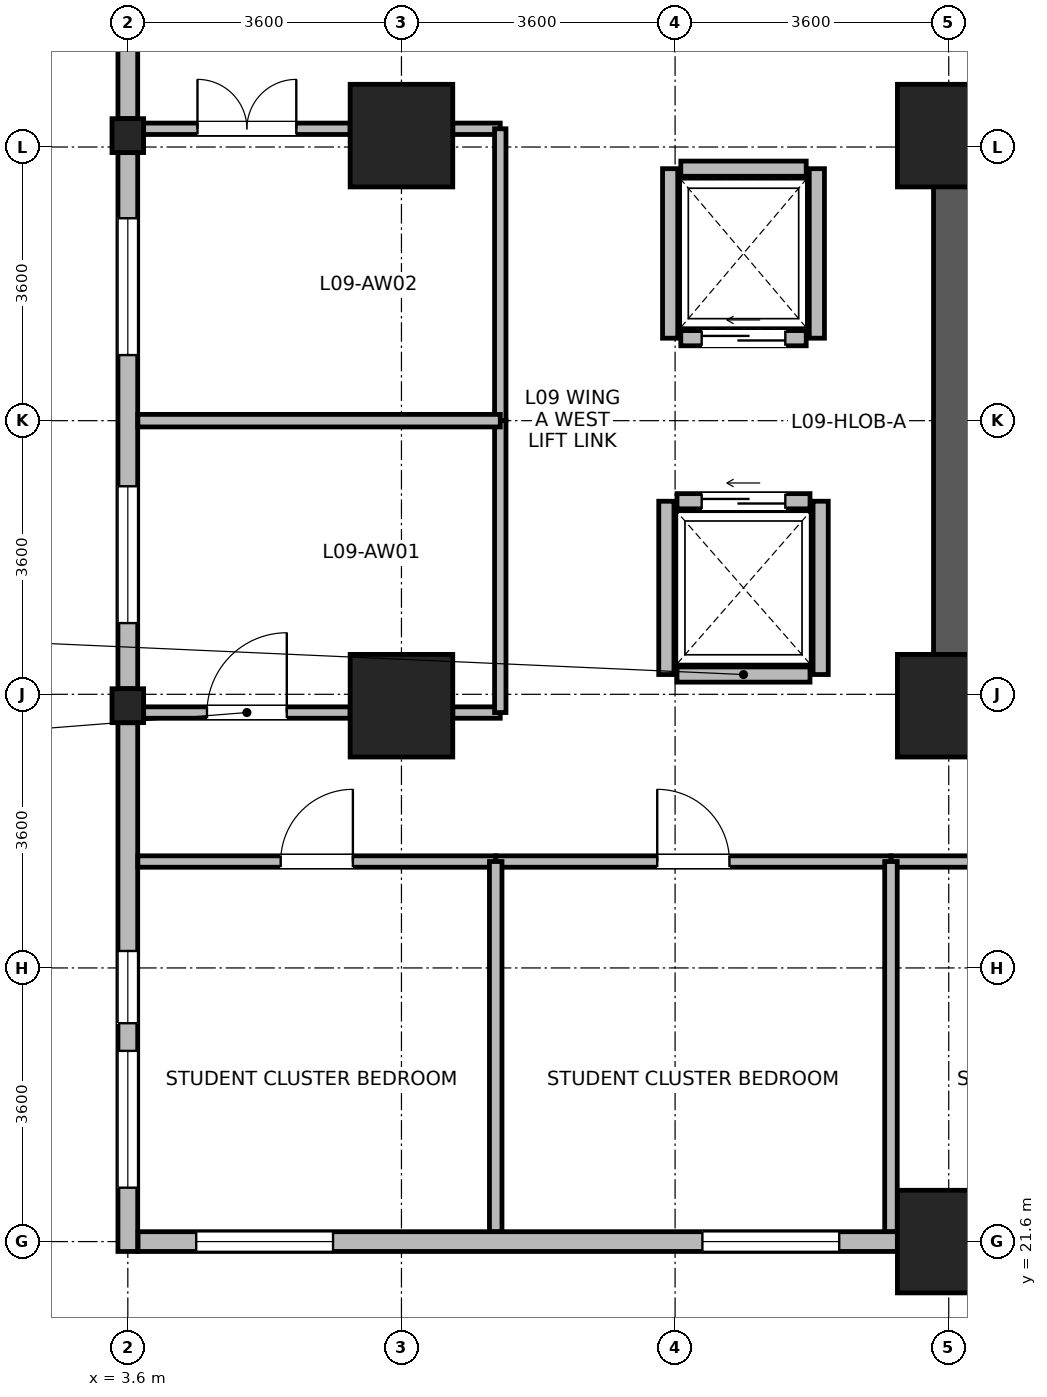
"""IFC4 building model, lengths in metres.
Left out: names, types, materials, properties, quantities, classifications, styles, units other than length and angle.
Written with IfcOpenShell. Run it as: python <this file> out.ifc"""

import sys

from ifc_helpers import new_model, si_unit, direction, frame, frame_2d, origin, origin_2d, place, context, subcontext, project, spatial, rectangle, i_section, extrude, source, transform, mapped, element, fill, save


model = new_model("IFC4")
c1 = context("Model", 3, precision=1e-05, world=origin(), true_north=direction((0.0, 1.0)))
c2 = subcontext(c1, "Body", "Model", "MODEL_VIEW")
j1 = project(units=[si_unit("LENGTHUNIT", "METRE"), si_unit("PLANEANGLEUNIT", "RADIAN")], contexts=[c1])
p1 = place(None, origin())
s1 = spatial("IfcSite", under=j1, at=p1, CompositionType="ELEMENT")
p2 = place(p1, origin())
s2 = spatial("IfcBuilding", under=s1, at=p2, CompositionType="ELEMENT")
p3 = place(p2, frame((0.0, 0.0, 40.1)))
s3 = spatial("IfcBuildingStorey", under=s2, at=p3, CompositionType="ELEMENT", Elevation=40.1)
p4 = place(p3, frame((14.475, 28.3, 0.0), z_axis=(0.0, 0.0, 1.0), x_axis=(0.0, 1.0, 0.0)))
e1 = element("IfcWall", 1, at=p4, inside=s3, PredefinedType="SHEAR", context=c2, shape_type="SweptSolid", body=[
    extrude(rectangle(XDim=8.1, YDim=0.55, at=frame_2d((4.05, 0.0))), origin(), (0.0, 0.0, 1.0), 3.45),
])
m1 = source(origin(), c2, "Body", "SweptSolid", [
    extrude(rectangle(XDim=1.35, YDim=1.35, at=origin_2d()), origin(), (0.0, 0.0, 1.0), 3.7),
])
for number, where, z_axis, x_axis in (
    (2, (7.2, 28.65, 0.0), (0.0, 0.0, 1.0), (1.0, 0.0, 0.0)),
    (3, (7.2, 36.15, 0.0), (0.0, 0.0, 1.0), (1.0, 0.0, 0.0)),
    (4, (14.4, 21.6, 0.0), (0.0, 0.0, 1.0), (1.0, 0.0, 0.0)),
    (5, (14.4, 28.65, 0.0), (0.0, 0.0, 1.0), (1.0, 0.0, 0.0)),
    (6, (14.4, 36.15, 0.0), (0.0, 0.0, 1.0), (1.0, 0.0, 0.0)),
):
    element("IfcColumn", number, at=place(p3, frame(where, z_axis=z_axis, x_axis=x_axis)), inside=s3, PredefinedType="COLUMN", context=c2, shape_type="MappedRepresentation", body=[
        mapped(m1, transform((0.0, 0.0, 0.0), x_axis=(1.0, 0.0, 0.0), y_axis=(0.0, 1.0, 0.0), z_axis=(0.0, 0.0, 1.0), scale=1.0)),
    ])
m2 = source(origin(), c2, "Body", "SweptSolid", [
    extrude(i_section(OverallWidth=0.416, OverallDepth=0.446, WebThickness=0.029, FlangeThickness=0.04, FilletRadius=0.015, at=origin_2d()), origin(), (0.0, 0.0, 1.0), 3.7),
])
for number, where, z_axis, x_axis in (
    (7, (3.6, 28.65, 0.0), (0.0, 0.0, 1.0), (1.0, 0.0, 0.0)),
    (8, (3.6, 36.15, 0.0), (0.0, 0.0, 1.0), (1.0, 0.0, 0.0)),
):
    element("IfcColumn", number, at=place(p3, frame(where, z_axis=z_axis, x_axis=x_axis)), inside=s3, PredefinedType="COLUMN", context=c2, shape_type="MappedRepresentation", body=[
        mapped(m2, transform((0.0, 0.0, 0.0), x_axis=(1.0, 0.0, 0.0), y_axis=(0.0, 1.0, 0.0), z_axis=(0.0, 0.0, 1.0), scale=1.0)),
    ])
p5 = place(p3, frame((3.6, 36.374, 0.0), z_axis=(0.0, 0.0, 1.0), x_axis=(0.0, 1.0, 0.0)))
e9 = element("IfcWall", 9, at=p5, inside=s3, PredefinedType="STANDARD", context=c2, shape_type="SweptSolid", body=[
    extrude(rectangle(XDim=6.956, YDim=0.26, at=frame_2d((3.478, 0.0))), origin(), (0.0, 0.0, 1.0), 3.43),
])
p6 = place(p5, frame((4.317, 0.0, 0.85)))
e10 = element("IfcOpeningElement", 10, at=p6, cuts=e9, PredefinedType="OPENING", context=c2, shape_type="SweptSolid", body=[
    extrude(rectangle(XDim=1.8, YDim=1.85, at=frame_2d((0.9, 0.925))), frame((0.0, 0.14, 0.0), z_axis=(0.0, -1.0, 0.0), x_axis=(1.0, 0.0, 0.0)), (0.0, 0.0, 1.0), 0.28),
])
p7 = place(p5, frame((3.003, 0.0, 0.85)))
e11 = element("IfcOpeningElement", 11, at=p7, cuts=e9, PredefinedType="OPENING", context=c2, shape_type="SweptSolid", body=[
    extrude(rectangle(XDim=0.95, YDim=1.75, at=frame_2d((0.475, 0.875))), frame((0.0, 0.14, 0.0), z_axis=(0.0, -1.0, 0.0), x_axis=(1.0, 0.0, 0.0)), (0.0, 0.0, 1.0), 0.28),
])
p8 = place(p3, frame((3.6, 28.874, 0.0), z_axis=(0.0, 0.0, 1.0), x_axis=(0.0, 1.0, 0.0)))
e12 = element("IfcWall", 12, at=p8, inside=s3, PredefinedType="STANDARD", context=c2, shape_type="SweptSolid", body=[
    extrude(rectangle(XDim=7.052, YDim=0.26, at=frame_2d((3.526, 0.0))), origin(), (0.0, 0.0, 1.0), 2.93),
])
p9 = place(p8, frame((0.863, 0.0, 0.85)))
e13 = element("IfcOpeningElement", 13, at=p9, cuts=e12, PredefinedType="OPENING", context=c2, shape_type="SweptSolid", body=[
    extrude(rectangle(XDim=1.8, YDim=1.85, at=frame_2d((0.9, 0.925))), frame((0.0, 0.14, 0.0), z_axis=(0.0, -1.0, 0.0), x_axis=(1.0, 0.0, 0.0)), (0.0, 0.0, 1.0), 0.28),
])
p10 = place(p8, frame((4.389, 0.0, 0.85)))
e14 = element("IfcOpeningElement", 14, at=p10, cuts=e12, PredefinedType="OPENING", context=c2, shape_type="SweptSolid", body=[
    extrude(rectangle(XDim=1.8, YDim=1.85, at=frame_2d((0.9, 0.925))), frame((0.0, 0.14, 0.0), z_axis=(0.0, -1.0, 0.0), x_axis=(1.0, 0.0, 0.0)), (0.0, 0.0, 1.0), 0.28),
])
p11 = place(p3, frame((3.6, 21.47, 0.0), z_axis=(0.0, 0.0, 1.0), x_axis=(0.0, 1.0, 0.0)))
e15 = element("IfcWall", 15, at=p11, inside=s3, PredefinedType="STANDARD", context=c2, shape_type="SweptSolid", body=[
    extrude(rectangle(XDim=6.956, YDim=0.26, at=frame_2d((3.478, 0.0))), origin(), (0.0, 0.0, 1.0), 3.43),
])
p12 = place(p11, frame((0.839, 0.0, 0.85)))
e16 = element("IfcOpeningElement", 16, at=p12, cuts=e15, PredefinedType="OPENING", context=c2, shape_type="SweptSolid", body=[
    extrude(rectangle(XDim=1.8, YDim=1.85, at=frame_2d((0.9, 0.925))), frame((0.0, 0.14, 0.0), z_axis=(0.0, -1.0, 0.0), x_axis=(1.0, 0.0, 0.0)), (0.0, 0.0, 1.0), 0.28),
])
p13 = place(p11, frame((3.003, 0.0, 0.85)))
e17 = element("IfcOpeningElement", 17, at=p13, cuts=e15, PredefinedType="OPENING", context=c2, shape_type="SweptSolid", body=[
    extrude(rectangle(XDim=0.95, YDim=1.75, at=frame_2d((0.475, 0.875))), frame((0.0, 0.14, 0.0), z_axis=(0.0, -1.0, 0.0), x_axis=(1.0, 0.0, 0.0)), (0.0, 0.0, 1.0), 0.28),
])
p14 = place(p3, frame((13.724, 21.6, 0.0), z_axis=(0.0, 0.0, 1.0), x_axis=(-1.0, 0.0, 0.0)))
e18 = element("IfcWall", 18, at=p14, inside=s3, PredefinedType="STANDARD", context=c2, shape_type="SweptSolid", body=[
    extrude(rectangle(XDim=9.989, YDim=0.26, at=frame_2d((4.995, 0.0))), origin(), (0.0, 0.0, 1.0), 3.43),
])
p15 = place(p14, frame((0.765, 0.0, 0.85)))
e19 = element("IfcOpeningElement", 19, at=p15, cuts=e18, PredefinedType="OPENING", context=c2, shape_type="SweptSolid", body=[
    extrude(rectangle(XDim=1.8, YDim=1.85, at=frame_2d((0.9, 0.925))), frame((0.0, 0.14, 0.0), z_axis=(0.0, -1.0, 0.0), x_axis=(1.0, 0.0, 0.0)), (0.0, 0.0, 1.0), 0.28),
])
p16 = place(p14, frame((7.424, 0.0, 0.85)))
e20 = element("IfcOpeningElement", 20, at=p16, cuts=e18, PredefinedType="OPENING", context=c2, shape_type="SweptSolid", body=[
    extrude(rectangle(XDim=1.8, YDim=1.85, at=frame_2d((0.9, 0.925))), frame((0.0, 0.14, 0.0), z_axis=(0.0, -1.0, 0.0), x_axis=(1.0, 0.0, 0.0)), (0.0, 0.0, 1.0), 0.28),
])
p17 = place(p3, frame((10.825, 29.06, 0.0), z_axis=(0.0, 0.0, 1.0), x_axis=(1.0, 0.0, 0.0)))
e21 = element("IfcWall", 21, at=p17, inside=s3, PredefinedType="PARTITIONING", context=c2, shape_type="SweptSolid", body=[
    extrude(rectangle(XDim=1.75, YDim=0.2, at=frame_2d((0.875, 0.0))), origin(), (0.0, 0.0, 1.0), 3.43),
])
p18 = place(p3, frame((10.825, 31.34, 0.0), z_axis=(0.0, 0.0, 1.0), x_axis=(1.0, 0.0, 0.0)))
e22 = element("IfcWall", 22, at=p18, inside=s3, PredefinedType="PARTITIONING", context=c2, shape_type="SweptSolid", body=[
    extrude(rectangle(XDim=1.75, YDim=0.2, at=frame_2d((0.875, 0.0))), origin(), (0.0, 0.0, 1.0), 3.43),
])
p19 = place(p18, frame((0.325, 0.0, 0.0)))
e23 = element("IfcOpeningElement", 23, at=p19, cuts=e22, PredefinedType="OPENING", context=c2, shape_type="SweptSolid", body=[
    extrude(rectangle(XDim=1.1, YDim=2.12, at=frame_2d((0.55, 1.06))), frame((0.0, 0.11, 0.0), z_axis=(0.0, -1.0, 0.0), x_axis=(1.0, 0.0, 0.0)), (0.0, 0.0, 1.0), 0.22),
])
for number, where, z_axis, x_axis in (
    (24, (10.685, 29.06, 0.0), (0.0, 0.0, 1.0), (0.0, 1.0, 0.0)),
    (25, (12.715, 29.06, 0.0), (0.0, 0.0, 1.0), (0.0, 1.0, 0.0)),
):
    element("IfcWall", number, at=place(p3, frame(where, z_axis=z_axis, x_axis=x_axis)), inside=s3, PredefinedType="PARTITIONING", context=c2, shape_type="SweptSolid", body=[
        extrude(rectangle(XDim=2.28, YDim=0.2, at=frame_2d((1.14, 0.0))), origin(), (0.0, 0.0, 1.0), 3.43),
    ])
p20 = place(p3, frame((10.875, 33.485, 0.0), z_axis=(0.0, 0.0, 1.0), x_axis=(1.0, 0.0, 0.0)))
e26 = element("IfcWall", 26, at=p20, inside=s3, PredefinedType="PARTITIONING", context=c2, shape_type="SweptSolid", body=[
    extrude(rectangle(XDim=1.65, YDim=0.2, at=frame_2d((0.825, 0.0))), origin(), (0.0, 0.0, 1.0), 3.43),
])
p21 = place(p20, frame((0.275, 0.0, 0.0)))
e27 = element("IfcOpeningElement", 27, at=p21, cuts=e26, PredefinedType="OPENING", context=c2, shape_type="SweptSolid", body=[
    extrude(rectangle(XDim=1.1, YDim=2.12, at=frame_2d((0.55, 1.06))), frame((0.0, 0.11, 0.0), z_axis=(0.0, -1.0, 0.0), x_axis=(1.0, 0.0, 0.0)), (0.0, 0.0, 1.0), 0.22),
])
p22 = place(p3, frame((10.875, 35.715, 0.0), z_axis=(0.0, 0.0, 1.0), x_axis=(1.0, 0.0, 0.0)))
e28 = element("IfcWall", 28, at=p22, inside=s3, PredefinedType="PARTITIONING", context=c2, shape_type="SweptSolid", body=[
    extrude(rectangle(XDim=1.65, YDim=0.2, at=frame_2d((0.825, 0.0))), origin(), (0.0, 0.0, 1.0), 3.43),
])
for number, where, z_axis, x_axis in (
    (29, (10.735, 33.485, 0.0), (0.0, 0.0, 1.0), (0.0, 1.0, 0.0)),
    (30, (12.665, 33.485, 0.0), (0.0, 0.0, 1.0), (0.0, 1.0, 0.0)),
):
    element("IfcWall", number, at=place(p3, frame(where, z_axis=z_axis, x_axis=x_axis)), inside=s3, PredefinedType="PARTITIONING", context=c2, shape_type="SweptSolid", body=[
        extrude(rectangle(XDim=2.23, YDim=0.2, at=frame_2d((1.115, 0.0))), origin(), (0.0, 0.0, 1.0), 3.43),
    ])
p23 = place(p3, frame((13.64, 26.6, 0.0), z_axis=(0.0, 0.0, 1.0), x_axis=(1.0, 0.0, 0.0)))
e31 = element("IfcWall", 31, at=p23, inside=s3, PredefinedType="PARTITIONING", context=c2, shape_type="SweptSolid", body=[
    extrude(rectangle(XDim=5.58, YDim=0.15, at=frame_2d((2.79, 0.0))), origin(), (0.0, 0.0, 1.0), 3.43),
])
p24 = place(p23, frame((2.315, 0.0, 0.0)))
e32 = element("IfcOpeningElement", 32, at=p24, cuts=e31, PredefinedType="OPENING", context=c2, shape_type="SweptSolid", body=[
    extrude(rectangle(XDim=0.95, YDim=2.1, at=frame_2d((0.475, 1.05))), frame((0.0, 0.085, 0.0), z_axis=(0.0, -1.0, 0.0), x_axis=(1.0, 0.0, 0.0)), (0.0, 0.0, 1.0), 0.17),
])
p25 = place(p3, frame((8.44, 26.6, 0.0), z_axis=(0.0, 0.0, 1.0), x_axis=(1.0, 0.0, 0.0)))
e33 = element("IfcWall", 33, at=p25, inside=s3, PredefinedType="PARTITIONING", context=c2, shape_type="SweptSolid", body=[
    extrude(rectangle(XDim=5.2, YDim=0.15, at=frame_2d((2.6, 0.0))), origin(), (0.0, 0.0, 1.0), 3.43),
])
p26 = place(p25, frame((2.125, 0.0, 0.0)))
e34 = element("IfcOpeningElement", 34, at=p26, cuts=e33, PredefinedType="OPENING", context=c2, shape_type="SweptSolid", body=[
    extrude(rectangle(XDim=0.95, YDim=2.1, at=frame_2d((0.475, 1.05))), frame((0.0, 0.085, 0.0), z_axis=(0.0, -1.0, 0.0), x_axis=(1.0, 0.0, 0.0)), (0.0, 0.0, 1.0), 0.17),
])
p27 = place(p3, frame((3.808, 28.56, 0.0), z_axis=(0.0, 0.0, 1.0), x_axis=(1.0, 0.0, 0.0)))
e35 = element("IfcWall", 35, at=p27, inside=s3, PredefinedType="PARTITIONING", context=c2, shape_type="SweptSolid", body=[
    extrude(rectangle(XDim=2.717, YDim=0.15, at=frame_2d((1.358, 0.0))), origin(), (0.0, 0.0, 1.0), 2.78),
])
p28 = place(p27, frame((0.833, 0.0, 0.0)))
e36 = element("IfcOpeningElement", 36, at=p28, cuts=e35, PredefinedType="OPENING", context=c2, shape_type="SweptSolid", body=[
    extrude(rectangle(XDim=1.05, YDim=2.12, at=frame_2d((0.525, 1.06))), frame((0.0, 0.085, 0.0), z_axis=(0.0, -1.0, 0.0), x_axis=(1.0, 0.0, 0.0)), (0.0, 0.0, 1.0), 0.17),
])
p29 = place(p3, frame((7.875, 28.56, 0.0), z_axis=(0.0, 0.0, 1.0), x_axis=(1.0, 0.0, 0.0)))
e37 = element("IfcWall", 37, at=p29, inside=s3, PredefinedType="PARTITIONING", context=c2, shape_type="SweptSolid", body=[
    extrude(rectangle(XDim=0.625, YDim=0.15, at=frame_2d((0.312, 0.0))), origin(), (0.0, 0.0, 1.0), 2.78),
])
p30 = place(p3, frame((3.808, 36.24, 0.0), z_axis=(0.0, 0.0, 1.0), x_axis=(1.0, 0.0, 0.0)))
e38 = element("IfcWall", 38, at=p30, inside=s3, PredefinedType="PARTITIONING", context=c2, shape_type="SweptSolid", body=[
    extrude(rectangle(XDim=2.717, YDim=0.15, at=frame_2d((1.358, 0.0))), origin(), (0.0, 0.0, 1.0), 2.78),
])
p31 = place(p30, frame((0.708, 0.0, 0.0)))
e39 = element("IfcOpeningElement", 39, at=p31, cuts=e38, PredefinedType="OPENING", context=c2, shape_type="SweptSolid", body=[
    extrude(rectangle(XDim=1.3, YDim=2.12, at=frame_2d((0.65, 1.06))), frame((0.0, 0.085, 0.0), z_axis=(0.0, -1.0, 0.0), x_axis=(1.0, 0.0, 0.0)), (0.0, 0.0, 1.0), 0.17),
])
p32 = place(p3, frame((7.875, 36.24, 0.0), z_axis=(0.0, 0.0, 1.0), x_axis=(1.0, 0.0, 0.0)))
e40 = element("IfcWall", 40, at=p32, inside=s3, PredefinedType="PARTITIONING", context=c2, shape_type="SweptSolid", body=[
    extrude(rectangle(XDim=0.625, YDim=0.15, at=frame_2d((0.312, 0.0))), origin(), (0.0, 0.0, 1.0), 2.78),
])
p33 = place(p3, frame((3.732, 26.6, 0.0), z_axis=(0.0, 0.0, 1.0), x_axis=(1.0, 0.0, 0.0)))
e41 = element("IfcWall", 41, at=p33, inside=s3, PredefinedType="PARTITIONING", context=c2, shape_type="SweptSolid", body=[
    extrude(rectangle(XDim=4.708, YDim=0.15, at=frame_2d((2.354, 0.0))), origin(), (0.0, 0.0, 1.0), 3.43),
])
p34 = place(p33, frame((1.879, 0.0, 0.0)))
e42 = element("IfcOpeningElement", 42, at=p34, cuts=e41, PredefinedType="OPENING", context=c2, shape_type="SweptSolid", body=[
    extrude(rectangle(XDim=0.95, YDim=2.1, at=frame_2d((0.475, 1.05))), frame((0.0, 0.085, 0.0), z_axis=(0.0, -1.0, 0.0), x_axis=(1.0, 0.0, 0.0)), (0.0, 0.0, 1.0), 0.17),
])
p35 = place(p3, frame((8.5, 32.4, 0.0), z_axis=(0.0, 0.0, 1.0), x_axis=(0.0, 1.0, 0.0)))
e43 = element("IfcWall", 43, at=p35, inside=s3, PredefinedType="PARTITIONING", context=c2, shape_type="SweptSolid", body=[
    extrude(rectangle(XDim=3.84, YDim=0.15, at=frame_2d((1.92, 0.0))), origin(), (0.0, 0.0, 1.0), 3.43),
])
p36 = place(p3, frame((8.5, 28.56, 0.0), z_axis=(0.0, 0.0, 1.0), x_axis=(0.0, 1.0, 0.0)))
e44 = element("IfcWall", 44, at=p36, inside=s3, PredefinedType="PARTITIONING", context=c2, shape_type="SweptSolid", body=[
    extrude(rectangle(XDim=3.84, YDim=0.15, at=frame_2d((1.92, 0.0))), origin(), (0.0, 0.0, 1.0), 3.43),
])
for number, where, z_axis, x_axis in (
    (45, (8.44, 21.732, 0.0), (0.0, 0.0, 1.0), (0.0, 1.0, 0.0)),
    (46, (13.64, 21.732, 0.0), (0.0, 0.0, 1.0), (0.0, 1.0, 0.0)),
):
    element("IfcWall", number, at=place(p3, frame(where, z_axis=z_axis, x_axis=x_axis)), inside=s3, PredefinedType="PARTITIONING", context=c2, shape_type="SweptSolid", body=[
        extrude(rectangle(XDim=4.868, YDim=0.165, at=frame_2d((2.434, 0.0))), origin(), (0.0, 0.0, 1.0), 3.43),
    ])
p37 = place(p3, frame((3.732, 32.4, 0.0), z_axis=(0.0, 0.0, 1.0), x_axis=(1.0, 0.0, 0.0)))
e47 = element("IfcWall", 47, at=p37, inside=s3, PredefinedType="PARTITIONING", context=c2, shape_type="SweptSolid", body=[
    extrude(rectangle(XDim=4.768, YDim=0.165, at=frame_2d((2.384, 0.0))), origin(), (0.0, 0.0, 1.0), 3.43),
])
p38 = place(p9, origin())
e48 = element("IfcWindow", 48, at=p38, inside=s3, PartitioningType="SINGLE_PANEL", PredefinedType="WINDOW", context=c2, shape_type="SweptSolid", body=[
    extrude(rectangle(XDim=1.8, YDim=1.85, at=frame_2d((0.9, 0.925))), frame((0.0, 0.03, 0.0), z_axis=(0.0, -1.0, 0.0), x_axis=(1.0, 0.0, 0.0)), (0.0, 0.0, 1.0), 0.06),
])
fill(e13, e48)
p39 = place(p10, origin())
e49 = element("IfcWindow", 49, at=p39, inside=s3, PartitioningType="SINGLE_PANEL", PredefinedType="WINDOW", context=c2, shape_type="SweptSolid", body=[
    extrude(rectangle(XDim=1.8, YDim=1.85, at=frame_2d((0.9, 0.925))), frame((0.0, 0.03, 0.0), z_axis=(0.0, -1.0, 0.0), x_axis=(1.0, 0.0, 0.0)), (0.0, 0.0, 1.0), 0.06),
])
fill(e14, e49)
p40 = place(p12, origin())
e50 = element("IfcWindow", 50, at=p40, inside=s3, PartitioningType="SINGLE_PANEL", PredefinedType="WINDOW", context=c2, shape_type="SweptSolid", body=[
    extrude(rectangle(XDim=1.8, YDim=1.85, at=frame_2d((0.9, 0.925))), frame((0.0, 0.03, 0.0), z_axis=(0.0, -1.0, 0.0), x_axis=(1.0, 0.0, 0.0)), (0.0, 0.0, 1.0), 0.06),
])
fill(e16, e50)
p41 = place(p13, origin())
e51 = element("IfcWindow", 51, at=p41, inside=s3, PartitioningType="SINGLE_PANEL", PredefinedType="WINDOW", context=c2, shape_type="SweptSolid", body=[
    extrude(rectangle(XDim=0.95, YDim=1.75, at=frame_2d((0.475, 0.875))), frame((0.0, 0.03, 0.0), z_axis=(0.0, -1.0, 0.0), x_axis=(1.0, 0.0, 0.0)), (0.0, 0.0, 1.0), 0.06),
])
fill(e17, e51)
p42 = place(p15, origin())
e52 = element("IfcWindow", 52, at=p42, inside=s3, PartitioningType="SINGLE_PANEL", PredefinedType="WINDOW", context=c2, shape_type="SweptSolid", body=[
    extrude(rectangle(XDim=1.8, YDim=1.85, at=frame_2d((0.9, 0.925))), frame((0.0, 0.03, 0.0), z_axis=(0.0, -1.0, 0.0), x_axis=(1.0, 0.0, 0.0)), (0.0, 0.0, 1.0), 0.06),
])
fill(e19, e52)
p43 = place(p16, origin())
e53 = element("IfcWindow", 53, at=p43, inside=s3, PartitioningType="SINGLE_PANEL", PredefinedType="WINDOW", context=c2, shape_type="SweptSolid", body=[
    extrude(rectangle(XDim=1.8, YDim=1.85, at=frame_2d((0.9, 0.925))), frame((0.0, 0.03, 0.0), z_axis=(0.0, -1.0, 0.0), x_axis=(1.0, 0.0, 0.0)), (0.0, 0.0, 1.0), 0.06),
])
fill(e20, e53)
p44 = place(p19, origin())
e54 = element("IfcDoor", 54, at=p44, inside=s3, OperationType="SLIDING_TO_LEFT", PredefinedType="DOOR", context=c2, shape_type="SweptSolid", body=[
    extrude(rectangle(XDim=1.1, YDim=2.12, at=frame_2d((0.55, 1.06))), frame((0.0, 0.025, 0.0), z_axis=(0.0, -1.0, 0.0), x_axis=(1.0, 0.0, 0.0)), (0.0, 0.0, 1.0), 0.05),
])
fill(e23, e54)
p45 = place(p21, origin())
e55 = element("IfcDoor", 55, at=p45, inside=s3, OperationType="SLIDING_TO_LEFT", PredefinedType="DOOR", context=c2, shape_type="SweptSolid", body=[
    extrude(rectangle(XDim=1.1, YDim=2.12, at=frame_2d((0.55, 1.06))), frame((0.0, 0.025, 0.0), z_axis=(0.0, -1.0, 0.0), x_axis=(1.0, 0.0, 0.0)), (0.0, 0.0, 1.0), 0.05),
])
fill(e27, e55)
p46 = place(p26, origin())
e56 = element("IfcDoor", 56, at=p46, inside=s3, OperationType="SINGLE_SWING_LEFT", PredefinedType="DOOR", context=c2, shape_type="SweptSolid", body=[
    extrude(rectangle(XDim=0.95, YDim=2.1, at=frame_2d((0.475, 1.05))), frame((0.0, 0.025, 0.0), z_axis=(0.0, -1.0, 0.0), x_axis=(1.0, 0.0, 0.0)), (0.0, 0.0, 1.0), 0.05),
])
fill(e34, e56)
p47 = place(p28, origin())
e57 = element("IfcDoor", 57, at=p47, inside=s3, OperationType="SINGLE_SWING_RIGHT", PredefinedType="DOOR", context=c2, shape_type="SweptSolid", body=[
    extrude(rectangle(XDim=1.05, YDim=2.12, at=frame_2d((0.525, 1.06))), frame((0.0, 0.025, 0.0), z_axis=(0.0, -1.0, 0.0), x_axis=(1.0, 0.0, 0.0)), (0.0, 0.0, 1.0), 0.05),
])
fill(e36, e57)
p48 = place(p31, origin())
e58 = element("IfcDoor", 58, at=p48, inside=s3, OperationType="DOUBLE_DOOR_SINGLE_SWING", PredefinedType="DOOR", context=c2, shape_type="SweptSolid", body=[
    extrude(rectangle(XDim=1.3, YDim=2.12, at=frame_2d((0.65, 1.06))), frame((0.0, 0.025, 0.0), z_axis=(0.0, -1.0, 0.0), x_axis=(1.0, 0.0, 0.0)), (0.0, 0.0, 1.0), 0.05),
])
fill(e39, e58)
p49 = place(p34, origin())
e59 = element("IfcDoor", 59, at=p49, inside=s3, OperationType="SINGLE_SWING_RIGHT", PredefinedType="DOOR", context=c2, shape_type="SweptSolid", body=[
    extrude(rectangle(XDim=0.95, YDim=2.1, at=frame_2d((0.475, 1.05))), frame((0.0, 0.025, 0.0), z_axis=(0.0, -1.0, 0.0), x_axis=(1.0, 0.0, 0.0)), (0.0, 0.0, 1.0), 0.05),
])
fill(e42, e59)
save(model, sys.argv[1])
